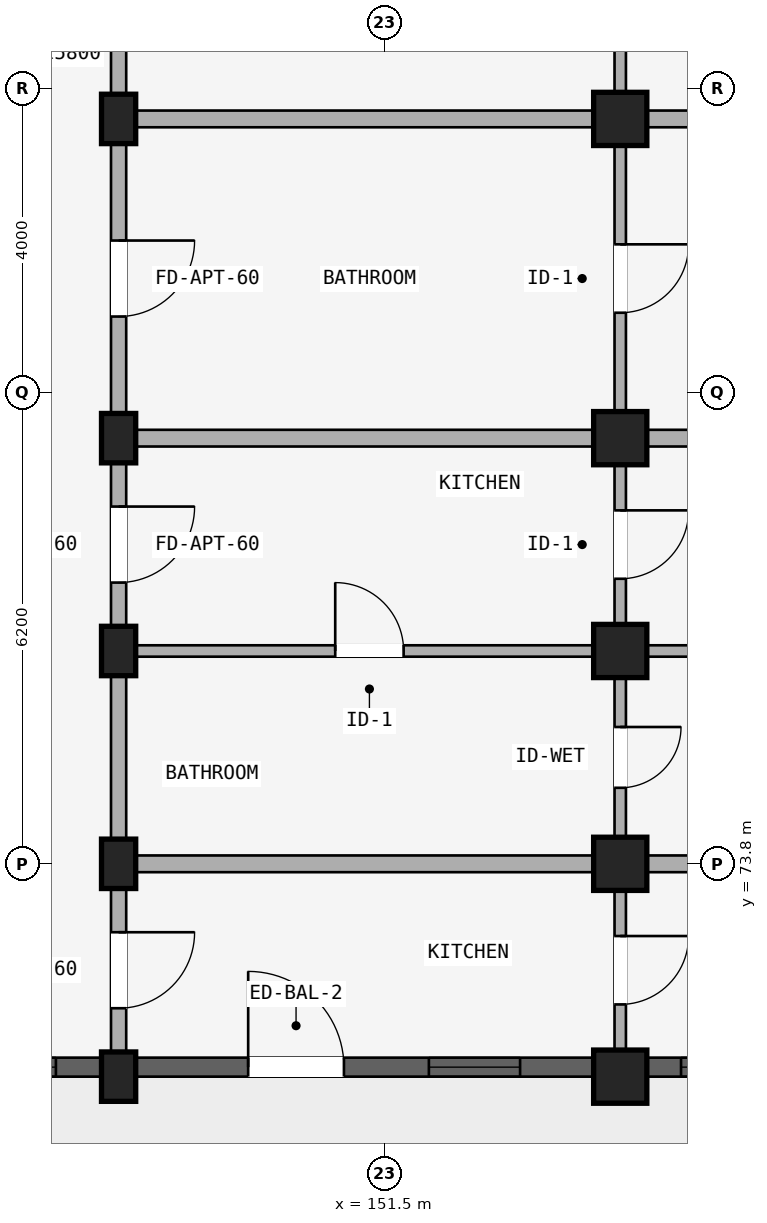
"""IFC4 building model, lengths in metres.
Left out: names, types, materials, properties, quantities, classifications, styles, units other than length and angle.
Written with IfcOpenShell. Run it as: python <this file> out.ifc"""

import sys

from ifc_helpers import new_model, si_unit, direction, frame, frame_2d, origin, origin_2d, place, context, subcontext, project, spatial, rectangle, extrude, element, fill, save


model = new_model("IFC4")
c1 = context("Model", 3, precision=1e-05, world=origin(), true_north=direction((0.0, 1.0)))
c2 = subcontext(c1, "Body", "Model", "MODEL_VIEW")
j1 = project(units=[si_unit("LENGTHUNIT", "METRE"), si_unit("PLANEANGLEUNIT", "RADIAN")], contexts=[c1])
p1 = place(None, origin())
s1 = spatial("IfcSite", under=j1, at=p1, CompositionType="ELEMENT")
p2 = place(p1, origin())
s2 = spatial("IfcBuilding", under=s1, at=p2, CompositionType="ELEMENT")
p3 = place(p2, frame((0.0, 0.0, 27.6)))
s3 = spatial("IfcBuildingStorey", under=s2, at=p3, CompositionType="ELEMENT", Elevation=27.6)
p4 = place(p3, frame((148.0, 83.6, 0.0), z_axis=(0.0, 0.0, 1.0), x_axis=(1.0, 0.0, 0.0)))
e1 = element("IfcColumn", 1, at=p4, inside=s3, PredefinedType="COLUMN", context=c2, shape_type="SweptSolid", body=[
    extrude(rectangle(XDim=0.45, YDim=0.65, at=origin_2d()), origin(), (0.0, 0.0, 1.0), 2.93),
])
p5 = place(p3, frame((154.6, 83.6, 0.0), z_axis=(0.0, 0.0, 1.0), x_axis=(1.0, 0.0, 0.0)))
e2 = element("IfcColumn", 2, at=p5, inside=s3, PredefinedType="COLUMN", context=c2, shape_type="SweptSolid", body=[
    extrude(rectangle(XDim=0.7, YDim=0.7, at=origin_2d()), origin(), (0.0, 0.0, 1.0), 2.93),
])
p6 = place(p3, frame((148.0, 79.4, 0.0), z_axis=(0.0, 0.0, 1.0), x_axis=(1.0, 0.0, 0.0)))
e3 = element("IfcColumn", 3, at=p6, inside=s3, PredefinedType="COLUMN", context=c2, shape_type="SweptSolid", body=[
    extrude(rectangle(XDim=0.45, YDim=0.65, at=origin_2d()), origin(), (0.0, 0.0, 1.0), 2.93),
])
p7 = place(p3, frame((154.6, 79.4, 0.0), z_axis=(0.0, 0.0, 1.0), x_axis=(1.0, 0.0, 0.0)))
e4 = element("IfcColumn", 4, at=p7, inside=s3, PredefinedType="COLUMN", context=c2, shape_type="SweptSolid", body=[
    extrude(rectangle(XDim=0.7, YDim=0.7, at=origin_2d()), origin(), (0.0, 0.0, 1.0), 2.93),
])
p8 = place(p3, frame((148.0, 76.6, 0.0), z_axis=(0.0, 0.0, 1.0), x_axis=(1.0, 0.0, 0.0)))
e5 = element("IfcColumn", 5, at=p8, inside=s3, PredefinedType="COLUMN", context=c2, shape_type="SweptSolid", body=[
    extrude(rectangle(XDim=0.45, YDim=0.65, at=origin_2d()), origin(), (0.0, 0.0, 1.0), 2.93),
])
p9 = place(p3, frame((154.6, 76.6, 0.0), z_axis=(0.0, 0.0, 1.0), x_axis=(1.0, 0.0, 0.0)))
e6 = element("IfcColumn", 6, at=p9, inside=s3, PredefinedType="COLUMN", context=c2, shape_type="SweptSolid", body=[
    extrude(rectangle(XDim=0.7, YDim=0.7, at=origin_2d()), origin(), (0.0, 0.0, 1.0), 2.93),
])
p10 = place(p3, frame((148.0, 73.8, 0.0), z_axis=(0.0, 0.0, 1.0), x_axis=(1.0, 0.0, 0.0)))
e7 = element("IfcColumn", 7, at=p10, inside=s3, PredefinedType="COLUMN", context=c2, shape_type="SweptSolid", body=[
    extrude(rectangle(XDim=0.45, YDim=0.65, at=origin_2d()), origin(), (0.0, 0.0, 1.0), 2.93),
])
p11 = place(p3, frame((154.6, 73.8, 0.0), z_axis=(0.0, 0.0, 1.0), x_axis=(1.0, 0.0, 0.0)))
e8 = element("IfcColumn", 8, at=p11, inside=s3, PredefinedType="COLUMN", context=c2, shape_type="SweptSolid", body=[
    extrude(rectangle(XDim=0.7, YDim=0.7, at=origin_2d()), origin(), (0.0, 0.0, 1.0), 2.93),
])
p12 = place(p3, frame((148.0, 71.0, 0.0), z_axis=(0.0, 0.0, 1.0), x_axis=(1.0, 0.0, 0.0)))
e9 = element("IfcColumn", 9, at=p12, inside=s3, PredefinedType="COLUMN", context=c2, shape_type="SweptSolid", body=[
    extrude(rectangle(XDim=0.45, YDim=0.65, at=origin_2d()), origin(), (0.0, 0.0, 1.0), 2.93),
])
p13 = place(p3, frame((154.6, 71.0, 0.0), z_axis=(0.0, 0.0, 1.0), x_axis=(1.0, 0.0, 0.0)))
e10 = element("IfcColumn", 10, at=p13, inside=s3, PredefinedType="COLUMN", context=c2, shape_type="SweptSolid", body=[
    extrude(rectangle(XDim=0.7, YDim=0.7, at=origin_2d()), origin(), (0.0, 0.0, 1.0), 2.93),
])
p14 = place(p3, frame((148.0, 87.65, 0.0), z_axis=(0.0, 0.0, 1.0), x_axis=(0.0, -1.0, 0.0)))
e11 = element("IfcWall", 11, at=p14, inside=s3, PredefinedType="STANDARD", context=c2, shape_type="SweptSolid", body=[
    extrude(rectangle(XDim=4.05, YDim=0.2, at=frame_2d((2.025, 0.0))), origin(), (0.0, 0.0, 1.0), 2.372),
])
p15 = place(p14, frame((1.525, 0.0, 0.0)))
e12 = element("IfcOpeningElement", 12, at=p15, cuts=e11, PredefinedType="OPENING", context=c2, shape_type="SweptSolid", body=[
    extrude(rectangle(XDim=1.0, YDim=2.15, at=frame_2d((0.5, 1.075))), frame((0.0, 0.11, 0.0), z_axis=(0.0, -1.0, 0.0), x_axis=(1.0, 0.0, 0.0)), (0.0, 0.0, 1.0), 0.22),
])
p16 = place(p3, frame((154.6, 87.57, 0.0), z_axis=(0.0, 0.0, 1.0), x_axis=(0.0, -1.0, 0.0)))
e13 = element("IfcWall", 13, at=p16, inside=s3, PredefinedType="PARTITIONING", context=c2, shape_type="SweptSolid", body=[
    extrude(rectangle(XDim=3.89, YDim=0.15, at=frame_2d((1.945, 0.0))), origin(), (0.0, 0.0, 1.0), 2.372),
])
p17 = place(p16, frame((1.495, 0.0, 0.0)))
e14 = element("IfcOpeningElement", 14, at=p17, cuts=e13, PredefinedType="OPENING", context=c2, shape_type="SweptSolid", body=[
    extrude(rectangle(XDim=0.9, YDim=2.1, at=frame_2d((0.45, 1.05))), frame((0.0, 0.085, 0.0), z_axis=(0.0, -1.0, 0.0), x_axis=(1.0, 0.0, 0.0)), (0.0, 0.0, 1.0), 0.17),
])
p18 = place(p3, frame((148.0, 83.6, 0.0), z_axis=(0.0, 0.0, 1.0), x_axis=(0.0, -1.0, 0.0)))
e15 = element("IfcWall", 15, at=p18, inside=s3, PredefinedType="STANDARD", context=c2, shape_type="SweptSolid", body=[
    extrude(rectangle(XDim=4.2, YDim=0.2, at=frame_2d((2.1, 0.0))), origin(), (0.0, 0.0, 1.0), 2.372),
])
p19 = place(p18, frame((1.6, 0.0, 0.0)))
e16 = element("IfcOpeningElement", 16, at=p19, cuts=e15, PredefinedType="OPENING", context=c2, shape_type="SweptSolid", body=[
    extrude(rectangle(XDim=1.0, YDim=2.15, at=frame_2d((0.5, 1.075))), frame((0.0, 0.11, 0.0), z_axis=(0.0, -1.0, 0.0), x_axis=(1.0, 0.0, 0.0)), (0.0, 0.0, 1.0), 0.22),
])
p20 = place(p3, frame((154.6, 83.52, 0.0), z_axis=(0.0, 0.0, 1.0), x_axis=(0.0, -1.0, 0.0)))
e17 = element("IfcWall", 17, at=p20, inside=s3, PredefinedType="PARTITIONING", context=c2, shape_type="SweptSolid", body=[
    extrude(rectangle(XDim=4.04, YDim=0.15, at=frame_2d((2.02, 0.0))), origin(), (0.0, 0.0, 1.0), 2.372),
])
p21 = place(p20, frame((1.57, 0.0, 0.0)))
e18 = element("IfcOpeningElement", 18, at=p21, cuts=e17, PredefinedType="OPENING", context=c2, shape_type="SweptSolid", body=[
    extrude(rectangle(XDim=0.9, YDim=2.1, at=frame_2d((0.45, 1.05))), frame((0.0, 0.085, 0.0), z_axis=(0.0, -1.0, 0.0), x_axis=(1.0, 0.0, 0.0)), (0.0, 0.0, 1.0), 0.17),
])
p22 = place(p3, frame((148.05, 83.6, 0.0), z_axis=(0.0, 0.0, 1.0), x_axis=(1.0, 0.0, 0.0)))
e19 = element("IfcWall", 19, at=p22, inside=s3, PredefinedType="STANDARD", context=c2, shape_type="SweptSolid", body=[
    extrude(rectangle(XDim=17.53, YDim=0.22, at=frame_2d((8.765, 0.0))), origin(), (0.0, 0.0, 1.0), 2.372),
])
p23 = place(p3, frame((148.0, 79.4, 0.0), z_axis=(0.0, 0.0, 1.0), x_axis=(0.0, -1.0, 0.0)))
e20 = element("IfcWall", 20, at=p23, inside=s3, PredefinedType="STANDARD", context=c2, shape_type="SweptSolid", body=[
    extrude(rectangle(XDim=2.8, YDim=0.2, at=frame_2d((1.4, 0.0))), origin(), (0.0, 0.0, 1.0), 2.372),
])
p24 = place(p23, frame((0.9, 0.0, 0.0)))
e21 = element("IfcOpeningElement", 21, at=p24, cuts=e20, PredefinedType="OPENING", context=c2, shape_type="SweptSolid", body=[
    extrude(rectangle(XDim=1.0, YDim=2.15, at=frame_2d((0.5, 1.075))), frame((0.0, 0.11, 0.0), z_axis=(0.0, -1.0, 0.0), x_axis=(1.0, 0.0, 0.0)), (0.0, 0.0, 1.0), 0.22),
])
p25 = place(p3, frame((154.6, 79.32, 0.0), z_axis=(0.0, 0.0, 1.0), x_axis=(0.0, -1.0, 0.0)))
e22 = element("IfcWall", 22, at=p25, inside=s3, PredefinedType="PLUMBINGWALL", context=c2, shape_type="SweptSolid", body=[
    extrude(rectangle(XDim=2.64, YDim=0.15, at=frame_2d((1.32, 0.0))), origin(), (0.0, 0.0, 1.0), 2.372),
])
p26 = place(p25, frame((0.87, 0.0, 0.0)))
e23 = element("IfcOpeningElement", 23, at=p26, cuts=e22, PredefinedType="OPENING", context=c2, shape_type="SweptSolid", body=[
    extrude(rectangle(XDim=0.9, YDim=2.1, at=frame_2d((0.45, 1.05))), frame((0.0, 0.085, 0.0), z_axis=(0.0, -1.0, 0.0), x_axis=(1.0, 0.0, 0.0)), (0.0, 0.0, 1.0), 0.17),
])
p27 = place(p3, frame((148.1, 79.4, 0.0), z_axis=(0.0, 0.0, 1.0), x_axis=(1.0, 0.0, 0.0)))
e24 = element("IfcWall", 24, at=p27, inside=s3, PredefinedType="STANDARD", context=c2, shape_type="SweptSolid", body=[
    extrude(rectangle(XDim=17.42, YDim=0.22, at=frame_2d((8.71, 0.0))), origin(), (0.0, 0.0, 1.0), 2.372),
])
p28 = place(p3, frame((148.0, 76.6, 0.0), z_axis=(0.0, 0.0, 1.0), x_axis=(0.0, -1.0, 0.0)))
e25 = element("IfcWall", 25, at=p28, inside=s3, PredefinedType="STANDARD", context=c2, shape_type="SweptSolid", body=[
    extrude(rectangle(XDim=2.8, YDim=0.2, at=frame_2d((1.4, 0.0))), origin(), (0.0, 0.0, 1.0), 2.372),
])
p29 = place(p3, frame((154.6, 76.52, 0.0), z_axis=(0.0, 0.0, 1.0), x_axis=(0.0, -1.0, 0.0)))
e26 = element("IfcWall", 26, at=p29, inside=s3, PredefinedType="PLUMBINGWALL", context=c2, shape_type="SweptSolid", body=[
    extrude(rectangle(XDim=2.64, YDim=0.15, at=frame_2d((1.32, 0.0))), origin(), (0.0, 0.0, 1.0), 2.372),
])
p30 = place(p29, frame((0.92, 0.0, 0.0)))
e27 = element("IfcOpeningElement", 27, at=p30, cuts=e26, PredefinedType="OPENING", context=c2, shape_type="SweptSolid", body=[
    extrude(rectangle(XDim=0.8, YDim=2.1, at=frame_2d((0.4, 1.05))), frame((0.0, 0.085, 0.0), z_axis=(0.0, -1.0, 0.0), x_axis=(1.0, 0.0, 0.0)), (0.0, 0.0, 1.0), 0.17),
])
p31 = place(p3, frame((148.1, 76.6, 0.0), z_axis=(0.0, 0.0, 1.0), x_axis=(1.0, 0.0, 0.0)))
e28 = element("IfcWall", 28, at=p31, inside=s3, PredefinedType="PARTITIONING", context=c2, shape_type="SweptSolid", body=[
    extrude(rectangle(XDim=17.42, YDim=0.15, at=frame_2d((8.71, 0.0))), origin(), (0.0, 0.0, 1.0), 2.372),
])
p32 = place(p31, frame((2.75, 0.0, 0.0)))
e29 = element("IfcOpeningElement", 29, at=p32, cuts=e28, PredefinedType="OPENING", context=c2, shape_type="SweptSolid", body=[
    extrude(rectangle(XDim=0.9, YDim=2.1, at=frame_2d((0.45, 1.05))), frame((0.0, 0.085, 0.0), z_axis=(0.0, -1.0, 0.0), x_axis=(1.0, 0.0, 0.0)), (0.0, 0.0, 1.0), 0.17),
])
p33 = place(p3, frame((148.0, 73.8, 0.0), z_axis=(0.0, 0.0, 1.0), x_axis=(0.0, -1.0, 0.0)))
e30 = element("IfcWall", 30, at=p33, inside=s3, PredefinedType="STANDARD", context=c2, shape_type="SweptSolid", body=[
    extrude(rectangle(XDim=2.8, YDim=0.2, at=frame_2d((1.4, 0.0))), origin(), (0.0, 0.0, 1.0), 2.372),
])
p34 = place(p33, frame((0.9, 0.0, 0.0)))
e31 = element("IfcOpeningElement", 31, at=p34, cuts=e30, PredefinedType="OPENING", context=c2, shape_type="SweptSolid", body=[
    extrude(rectangle(XDim=1.0, YDim=2.15, at=frame_2d((0.5, 1.075))), frame((0.0, 0.11, 0.0), z_axis=(0.0, -1.0, 0.0), x_axis=(1.0, 0.0, 0.0)), (0.0, 0.0, 1.0), 0.22),
])
p35 = place(p3, frame((154.6, 73.72, 0.0), z_axis=(0.0, 0.0, 1.0), x_axis=(0.0, -1.0, 0.0)))
e32 = element("IfcWall", 32, at=p35, inside=s3, PredefinedType="PLUMBINGWALL", context=c2, shape_type="SweptSolid", body=[
    extrude(rectangle(XDim=2.64, YDim=0.15, at=frame_2d((1.32, 0.0))), origin(), (0.0, 0.0, 1.0), 2.372),
])
p36 = place(p35, frame((0.87, 0.0, 0.0)))
e33 = element("IfcOpeningElement", 33, at=p36, cuts=e32, PredefinedType="OPENING", context=c2, shape_type="SweptSolid", body=[
    extrude(rectangle(XDim=0.9, YDim=2.1, at=frame_2d((0.45, 1.05))), frame((0.0, 0.085, 0.0), z_axis=(0.0, -1.0, 0.0), x_axis=(1.0, 0.0, 0.0)), (0.0, 0.0, 1.0), 0.17),
])
p37 = place(p3, frame((148.1, 73.8, 0.0), z_axis=(0.0, 0.0, 1.0), x_axis=(1.0, 0.0, 0.0)))
e34 = element("IfcWall", 34, at=p37, inside=s3, PredefinedType="STANDARD", context=c2, shape_type="SweptSolid", body=[
    extrude(rectangle(XDim=17.42, YDim=0.22, at=frame_2d((8.71, 0.0))), origin(), (0.0, 0.0, 1.0), 2.372),
])
p38 = place(p3, frame((145.829, 71.125, 0.0), z_axis=(0.0, 0.0, 1.0), x_axis=(1.0, 0.0, 0.0)))
e35 = element("IfcWall", 35, at=p38, inside=s3, PredefinedType="STANDARD", context=c2, shape_type="SweptSolid", body=[
    extrude(rectangle(XDim=1.943, YDim=0.25, at=frame_2d((0.971, 0.0))), origin(), (0.0, 0.0, 1.0), 2.372),
])
p39 = place(p38, frame((0.596, 0.0, 0.88)))
e36 = element("IfcOpeningElement", 36, at=p39, cuts=e35, PredefinedType="OPENING", context=c2, shape_type="SweptSolid", body=[
    extrude(rectangle(XDim=0.75, YDim=1.05, at=frame_2d((0.375, 0.525))), frame((0.0, 0.135, 0.0), z_axis=(0.0, -1.0, 0.0), x_axis=(1.0, 0.0, 0.0)), (0.0, 0.0, 1.0), 0.27),
])
p40 = place(p3, frame((148.229, 71.125, 0.0), z_axis=(0.0, 0.0, 1.0), x_axis=(1.0, 0.0, 0.0)))
e37 = element("IfcWall", 37, at=p40, inside=s3, PredefinedType="STANDARD", context=c2, shape_type="SweptSolid", body=[
    extrude(rectangle(XDim=6.018, YDim=0.25, at=frame_2d((3.009, 0.0))), origin(), (0.0, 0.0, 1.0), 2.372),
])
p41 = place(p40, frame((3.854, 0.0, 0.522)))
e38 = element("IfcOpeningElement", 38, at=p41, cuts=e37, PredefinedType="OPENING", context=c2, shape_type="SweptSolid", body=[
    extrude(rectangle(XDim=1.2, YDim=1.5, at=frame_2d((0.6, 0.75))), frame((0.0, 0.135, 0.0), z_axis=(0.0, -1.0, 0.0), x_axis=(1.0, 0.0, 0.0)), (0.0, 0.0, 1.0), 0.27),
])
p42 = place(p40, frame((1.476, 0.0, 0.0)))
e39 = element("IfcOpeningElement", 39, at=p42, cuts=e37, PredefinedType="OPENING", context=c2, shape_type="SweptSolid", body=[
    extrude(rectangle(XDim=1.26, YDim=2.15, at=frame_2d((0.63, 1.075))), frame((0.0, 0.135, 0.0), z_axis=(0.0, -1.0, 0.0), x_axis=(1.0, 0.0, 0.0)), (0.0, 0.0, 1.0), 0.27),
])
p43 = place(p3, frame((154.954, 71.125, 0.0), z_axis=(0.0, 0.0, 1.0), x_axis=(1.0, 0.0, 0.0)))
e40 = element("IfcWall", 40, at=p43, inside=s3, PredefinedType="STANDARD", context=c2, shape_type="SweptSolid", body=[
    extrude(rectangle(XDim=2.093, YDim=0.25, at=frame_2d((1.046, 0.0))), origin(), (0.0, 0.0, 1.0), 2.372),
])
p44 = place(p43, frame((0.447, 0.0, 0.672)))
e41 = element("IfcOpeningElement", 41, at=p44, cuts=e40, PredefinedType="OPENING", context=c2, shape_type="SweptSolid", body=[
    extrude(rectangle(XDim=1.2, YDim=1.5, at=frame_2d((0.6, 0.75))), frame((0.0, 0.135, 0.0), z_axis=(0.0, -1.0, 0.0), x_axis=(1.0, 0.0, 0.0)), (0.0, 0.0, 1.0), 0.27),
])
p45 = place(p39, origin())
e42 = element("IfcWindow", 42, at=p45, inside=s3, PartitioningType="SINGLE_PANEL", PredefinedType="WINDOW", context=c2, shape_type="SweptSolid", body=[
    extrude(rectangle(XDim=0.75, YDim=1.05, at=frame_2d((0.375, 0.525))), frame((0.0, 0.03, 0.0), z_axis=(0.0, -1.0, 0.0), x_axis=(1.0, 0.0, 0.0)), (0.0, 0.0, 1.0), 0.06),
])
fill(e36, e42)
p46 = place(p41, origin())
e43 = element("IfcWindow", 43, at=p46, inside=s3, PartitioningType="SINGLE_PANEL", PredefinedType="WINDOW", context=c2, shape_type="SweptSolid", body=[
    extrude(rectangle(XDim=1.2, YDim=1.5, at=frame_2d((0.6, 0.75))), frame((0.0, 0.03, 0.0), z_axis=(0.0, -1.0, 0.0), x_axis=(1.0, 0.0, 0.0)), (0.0, 0.0, 1.0), 0.06),
])
fill(e38, e43)
p47 = place(p44, origin())
e44 = element("IfcWindow", 44, at=p47, inside=s3, PartitioningType="SINGLE_PANEL", PredefinedType="WINDOW", context=c2, shape_type="SweptSolid", body=[
    extrude(rectangle(XDim=1.2, YDim=1.5, at=frame_2d((0.6, 0.75))), frame((0.0, 0.03, 0.0), z_axis=(0.0, -1.0, 0.0), x_axis=(1.0, 0.0, 0.0)), (0.0, 0.0, 1.0), 0.06),
])
fill(e41, e44)
p48 = place(p19, frame((1.0, 0.0, 0.0), z_axis=(0.0, 0.0, 1.0), x_axis=(-1.0, 0.0, 0.0)))
e45 = element("IfcDoor", 45, at=p48, inside=s3, OperationType="SINGLE_SWING_RIGHT", PredefinedType="DOOR", context=c2, shape_type="SweptSolid", body=[
    extrude(rectangle(XDim=1.0, YDim=2.15, at=frame_2d((0.5, 1.075))), frame((0.0, 0.025, 0.0), z_axis=(0.0, -1.0, 0.0), x_axis=(1.0, 0.0, 0.0)), (0.0, 0.0, 1.0), 0.05),
])
fill(e16, e45)
p49 = place(p21, origin())
e46 = element("IfcDoor", 46, at=p49, inside=s3, OperationType="SINGLE_SWING_LEFT", PredefinedType="DOOR", context=c2, shape_type="SweptSolid", body=[
    extrude(rectangle(XDim=0.9, YDim=2.1, at=frame_2d((0.45, 1.05))), frame((0.0, 0.025, 0.0), z_axis=(0.0, -1.0, 0.0), x_axis=(1.0, 0.0, 0.0)), (0.0, 0.0, 1.0), 0.05),
])
fill(e18, e46)
p50 = place(p26, origin())
e47 = element("IfcDoor", 47, at=p50, inside=s3, OperationType="SINGLE_SWING_LEFT", PredefinedType="DOOR", context=c2, shape_type="SweptSolid", body=[
    extrude(rectangle(XDim=0.9, YDim=2.1, at=frame_2d((0.45, 1.05))), frame((0.0, 0.025, 0.0), z_axis=(0.0, -1.0, 0.0), x_axis=(1.0, 0.0, 0.0)), (0.0, 0.0, 1.0), 0.05),
])
fill(e23, e47)
p51 = place(p24, frame((1.0, 0.0, 0.0), z_axis=(0.0, 0.0, 1.0), x_axis=(-1.0, 0.0, 0.0)))
e48 = element("IfcDoor", 48, at=p51, inside=s3, OperationType="SINGLE_SWING_RIGHT", PredefinedType="DOOR", context=c2, shape_type="SweptSolid", body=[
    extrude(rectangle(XDim=1.0, YDim=2.15, at=frame_2d((0.5, 1.075))), frame((0.0, 0.025, 0.0), z_axis=(0.0, -1.0, 0.0), x_axis=(1.0, 0.0, 0.0)), (0.0, 0.0, 1.0), 0.05),
])
fill(e21, e48)
p52 = place(p30, origin())
e49 = element("IfcDoor", 49, at=p52, inside=s3, OperationType="SINGLE_SWING_LEFT", PredefinedType="DOOR", context=c2, shape_type="SweptSolid", body=[
    extrude(rectangle(XDim=0.8, YDim=2.1, at=frame_2d((0.4, 1.05))), frame((0.0, 0.025, 0.0), z_axis=(0.0, -1.0, 0.0), x_axis=(1.0, 0.0, 0.0)), (0.0, 0.0, 1.0), 0.05),
])
fill(e27, e49)
p53 = place(p32, origin())
e50 = element("IfcDoor", 50, at=p53, inside=s3, OperationType="SINGLE_SWING_LEFT", PredefinedType="DOOR", context=c2, shape_type="SweptSolid", body=[
    extrude(rectangle(XDim=0.9, YDim=2.1, at=frame_2d((0.45, 1.05))), frame((0.0, 0.025, 0.0), z_axis=(0.0, -1.0, 0.0), x_axis=(1.0, 0.0, 0.0)), (0.0, 0.0, 1.0), 0.05),
])
fill(e29, e50)
p54 = place(p36, origin())
e51 = element("IfcDoor", 51, at=p54, inside=s3, OperationType="SINGLE_SWING_LEFT", PredefinedType="DOOR", context=c2, shape_type="SweptSolid", body=[
    extrude(rectangle(XDim=0.9, YDim=2.1, at=frame_2d((0.45, 1.05))), frame((0.0, 0.025, 0.0), z_axis=(0.0, -1.0, 0.0), x_axis=(1.0, 0.0, 0.0)), (0.0, 0.0, 1.0), 0.05),
])
fill(e33, e51)
p55 = place(p34, frame((1.0, 0.0, 0.0), z_axis=(0.0, 0.0, 1.0), x_axis=(-1.0, 0.0, 0.0)))
e52 = element("IfcDoor", 52, at=p55, inside=s3, OperationType="SINGLE_SWING_RIGHT", PredefinedType="DOOR", context=c2, shape_type="SweptSolid", body=[
    extrude(rectangle(XDim=1.0, YDim=2.15, at=frame_2d((0.5, 1.075))), frame((0.0, 0.025, 0.0), z_axis=(0.0, -1.0, 0.0), x_axis=(1.0, 0.0, 0.0)), (0.0, 0.0, 1.0), 0.05),
])
fill(e31, e52)
p56 = place(p42, frame((1.26, 0.0, 0.0), z_axis=(0.0, 0.0, 1.0), x_axis=(-1.0, 0.0, 0.0)))
e53 = element("IfcDoor", 53, at=p56, inside=s3, OperationType="SINGLE_SWING_RIGHT", PredefinedType="DOOR", context=c2, shape_type="SweptSolid", body=[
    extrude(rectangle(XDim=1.26, YDim=2.15, at=frame_2d((0.63, 1.075))), frame((0.0, 0.025, 0.0), z_axis=(0.0, -1.0, 0.0), x_axis=(1.0, 0.0, 0.0)), (0.0, 0.0, 1.0), 0.05),
])
fill(e39, e53)
save(model, sys.argv[1])
